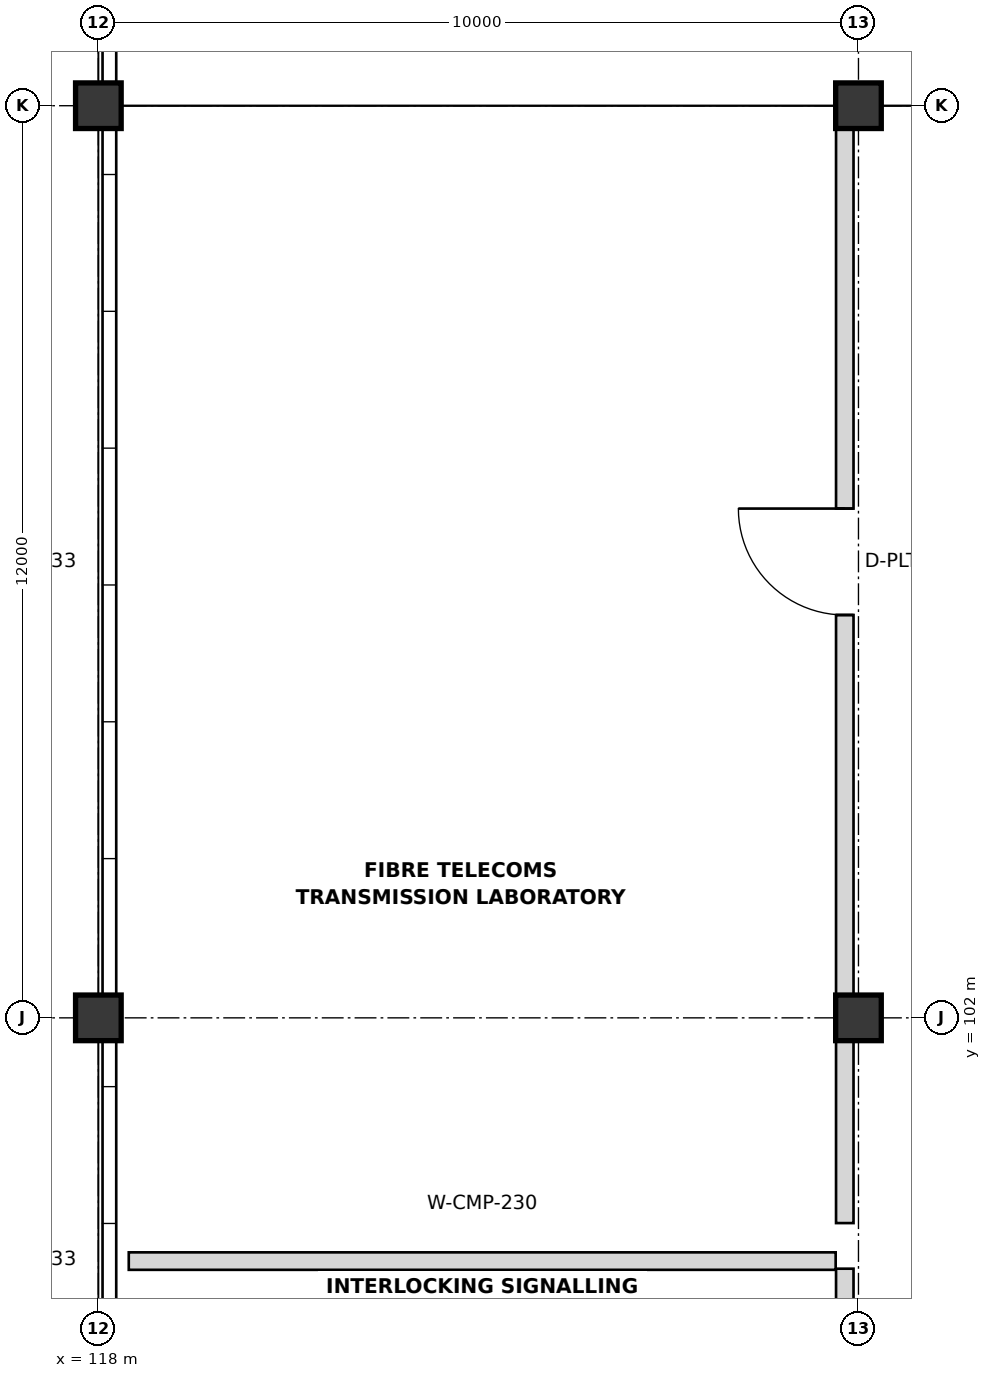
"""IFC4 building model, lengths in metres.
Left out: names, types, materials, properties, quantities, classifications, styles, units other than length and angle.
Written with IfcOpenShell. Run it as: python <this file> out.ifc"""

import sys

from ifc_helpers import new_model, si_unit, direction, frame, frame_2d, origin, origin_2d, place, context, subcontext, project, spatial, rectangle, extrude, element, fill, save


model = new_model("IFC4")
c1 = context("Model", 3, precision=1e-05, world=origin(), true_north=direction((0.0, 1.0)))
c2 = subcontext(c1, "Body", "Model", "MODEL_VIEW")
j1 = project(units=[si_unit("LENGTHUNIT", "METRE"), si_unit("PLANEANGLEUNIT", "RADIAN")], contexts=[c1])
p1 = place(None, origin())
s1 = spatial("IfcSite", under=j1, at=p1, CompositionType="ELEMENT")
p2 = place(p1, origin())
s2 = spatial("IfcBuilding", under=s1, at=p2, CompositionType="ELEMENT")
p3 = place(p2, frame((0.0, 0.0, 18.6)))
s3 = spatial("IfcBuildingStorey", under=s2, at=p3, CompositionType="ELEMENT", Elevation=18.6)
for number, where, z_axis, x_axis in (
    (1, (118.0, 102.0, 0.0), (0.0, 0.0, 1.0), (1.0, 0.0, 0.0)),
    (2, (118.0, 114.0, 0.0), (0.0, 0.0, 1.0), (1.0, 0.0, 0.0)),
    (3, (128.0, 102.0, 0.0), (0.0, 0.0, 1.0), (1.0, 0.0, 0.0)),
    (4, (128.0, 114.0, 0.0), (0.0, 0.0, 1.0), (1.0, 0.0, 0.0)),
):
    element("IfcColumn", number, at=place(p3, frame(where, z_axis=z_axis, x_axis=x_axis)), inside=s3, PredefinedType="COLUMN", context=c2, shape_type="SweptSolid", body=[
        extrude(rectangle(XDim=0.6, YDim=0.6, at=origin_2d()), origin(), (0.0, 0.0, 1.0), 4.2),
    ])
p4 = place(p3, frame((127.82, 78.3, 0.0), z_axis=(0.0, 0.0, 1.0), x_axis=(0.0, 1.0, 0.0)))
e5 = element("IfcWall", 5, at=p4, inside=s3, PredefinedType="PARTITIONING", context=c2, shape_type="SweptSolid", body=[
    extrude(rectangle(XDim=20.4, YDim=0.23, at=frame_2d((10.2, 0.0))), origin(), (0.0, 0.0, 1.0), 3.188),
])
p5 = place(p4, frame((5.0, 0.0, 0.0)))
e6 = element("IfcOpeningElement", 6, at=p5, cuts=e5, PredefinedType="OPENING", context=c2, shape_type="SweptSolid", body=[
    extrude(rectangle(XDim=1.4, YDim=2.2, at=frame_2d((0.7, 1.1))), frame((0.0, 0.125, 0.0), z_axis=(0.0, -1.0, 0.0), x_axis=(1.0, 0.0, 0.0)), (0.0, 0.0, 1.0), 0.25),
])
p6 = place(p3, frame((118.4, 98.8, 0.0), z_axis=(0.0, 0.0, 1.0), x_axis=(1.0, 0.0, 0.0)))
e7 = element("IfcWall", 7, at=p6, inside=s3, PredefinedType="PARTITIONING", context=c2, shape_type="SweptSolid", body=[
    extrude(rectangle(XDim=9.3, YDim=0.23, at=frame_2d((4.65, 0.0))), origin(), (0.0, 0.0, 1.0), 3.188),
])
p7 = place(p3, frame((127.82, 99.3, 0.0), z_axis=(0.0, 0.0, 1.0), x_axis=(0.0, 1.0, 0.0)))
e8 = element("IfcWall", 8, at=p7, inside=s3, PredefinedType="PARTITIONING", context=c2, shape_type="SweptSolid", body=[
    extrude(rectangle(XDim=14.4, YDim=0.23, at=frame_2d((7.2, 0.0))), origin(), (0.0, 0.0, 1.0), 3.188),
])
p8 = place(p7, frame((8.0, 0.0, 0.0)))
e9 = element("IfcOpeningElement", 9, at=p8, cuts=e8, PredefinedType="OPENING", context=c2, shape_type="SweptSolid", body=[
    extrude(rectangle(XDim=1.4, YDim=2.2, at=frame_2d((0.7, 1.1))), frame((0.0, 0.125, 0.0), z_axis=(0.0, -1.0, 0.0), x_axis=(1.0, 0.0, 0.0)), (0.0, 0.0, 1.0), 0.25),
])
p9 = place(p8, origin())
e10 = element("IfcDoor", 10, at=p9, inside=s3, OperationType="SINGLE_SWING_RIGHT", PredefinedType="DOOR", context=c2, shape_type="SweptSolid", body=[
    extrude(rectangle(XDim=1.4, YDim=2.2, at=frame_2d((0.7, 1.1))), frame((0.0, 0.025, 0.0), z_axis=(0.0, -1.0, 0.0), x_axis=(1.0, 0.0, 0.0)), (0.0, 0.0, 1.0), 0.05),
])
fill(e9, e10)
save(model, sys.argv[1])
